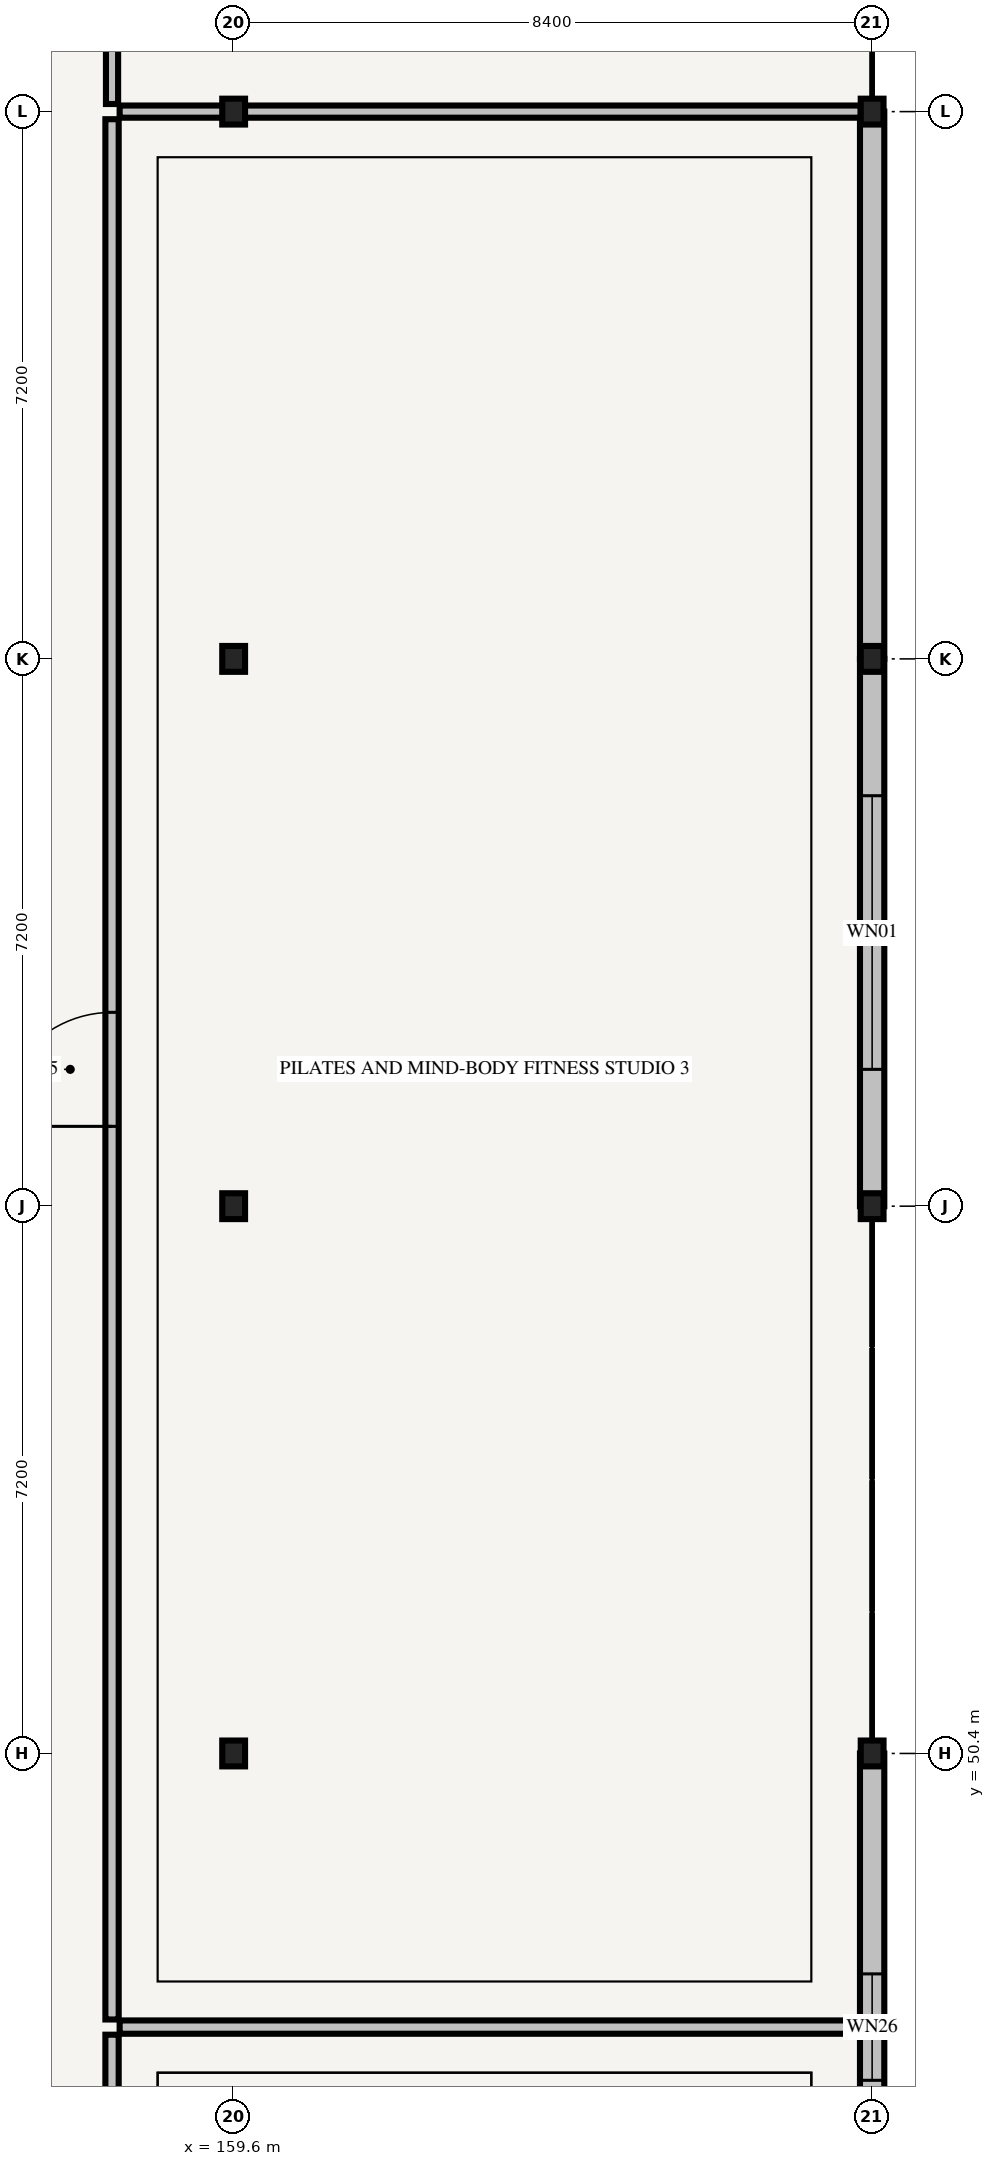
"""IFC4 building model, lengths in metres.
Left out: names, types, materials, properties, quantities, classifications, styles, units other than length and angle.
Written with IfcOpenShell. Run it as: python <this file> out.ifc"""

import sys

from ifc_helpers import new_model, si_unit, direction, frame, frame_2d, origin, origin_2d, place, context, subcontext, project, spatial, rectangle, i_section, extrude, element, fill, save


model = new_model("IFC4")
c1 = context("Model", 3, precision=1e-05, world=origin(), true_north=direction((0.0, 1.0)))
c2 = subcontext(c1, "Body", "Model", "MODEL_VIEW")
j1 = project(units=[si_unit("LENGTHUNIT", "METRE"), si_unit("PLANEANGLEUNIT", "RADIAN")], contexts=[c1])
p1 = place(None, origin())
s1 = spatial("IfcSite", under=j1, at=p1, CompositionType="ELEMENT")
p2 = place(p1, origin())
s2 = spatial("IfcBuilding", under=s1, at=p2, CompositionType="ELEMENT")
p3 = place(p2, frame((0.0, 0.0, 8.7)))
s3 = spatial("IfcBuildingStorey", under=s2, at=p3, CompositionType="ELEMENT", Elevation=8.7)
for number, where, z_axis, x_axis in (
    (1, (159.6, 50.4, 0.0), (0.0, 0.0, 1.0), (1.0, 0.0, 0.0)),
    (2, (159.6, 57.6, 0.0), (0.0, 0.0, 1.0), (1.0, 0.0, 0.0)),
    (3, (159.6, 64.8, 0.0), (0.0, 0.0, 1.0), (1.0, 0.0, 0.0)),
    (4, (159.6, 72.0, 0.0), (0.0, 0.0, 1.0), (1.0, 0.0, 0.0)),
    (5, (168.0, 50.4, 0.0), (0.0, 0.0, 1.0), (1.0, 0.0, 0.0)),
    (6, (168.0, 57.6, 0.0), (0.0, 0.0, 1.0), (1.0, 0.0, 0.0)),
    (7, (168.0, 64.8, 0.0), (0.0, 0.0, 1.0), (1.0, 0.0, 0.0)),
    (8, (168.0, 72.0, 0.0), (0.0, 0.0, 1.0), (1.0, 0.0, 0.0)),
):
    element("IfcColumn", number, at=place(p3, frame(where, z_axis=z_axis, x_axis=x_axis)), inside=s3, PredefinedType="COLUMN", context=c2, shape_type="SweptSolid", body=[
        extrude(i_section(OverallWidth=0.3, OverallDepth=0.34, WebThickness=0.012, FlangeThickness=0.021, FilletRadius=0.027, at=origin_2d()), origin(), (0.0, 0.0, 1.0), 4.2),
    ])
p4 = place(p3, frame((168.0, 43.2, 0.0), z_axis=(0.0, 0.0, 1.0), x_axis=(0.0, 1.0, 0.0)))
e9 = element("IfcWall", 9, at=p4, inside=s3, PredefinedType="STANDARD", context=c2, shape_type="SweptSolid", body=[
    extrude(rectangle(XDim=7.2, YDim=0.32, at=frame_2d((3.6, 0.0))), origin(), (0.0, 0.0, 1.0), 3.485),
])
p5 = place(p4, frame((2.9, 0.0, 0.85)))
e10 = element("IfcOpeningElement", 10, at=p5, cuts=e9, PredefinedType="OPENING", context=c2, shape_type="SweptSolid", body=[
    extrude(rectangle(XDim=1.4, YDim=1.2, at=frame_2d((0.7, 0.6))), frame((0.0, 0.185, 0.0), z_axis=(0.0, -1.0, 0.0), x_axis=(1.0, 0.0, 0.0)), (0.0, 0.0, 1.0), 0.37),
])
p6 = place(p3, frame((168.0, 57.6, 0.0), z_axis=(0.0, 0.0, 1.0), x_axis=(0.0, 1.0, 0.0)))
e11 = element("IfcWall", 11, at=p6, inside=s3, PredefinedType="STANDARD", context=c2, shape_type="SweptSolid", body=[
    extrude(rectangle(XDim=7.2, YDim=0.32, at=frame_2d((3.6, 0.0))), origin(), (0.0, 0.0, 1.0), 3.385),
])
p7 = place(p6, frame((1.8, 0.0, 0.805)))
e12 = element("IfcOpeningElement", 12, at=p7, cuts=e11, PredefinedType="OPENING", context=c2, shape_type="SweptSolid", body=[
    extrude(rectangle(XDim=3.6, YDim=2.4, at=frame_2d((1.8, 1.2))), frame((0.0, 0.185, 0.0), z_axis=(0.0, -1.0, 0.0), x_axis=(1.0, 0.0, 0.0)), (0.0, 0.0, 1.0), 0.37),
])
p8 = place(p3, frame((168.0, 64.8, 0.0), z_axis=(0.0, 0.0, 1.0), x_axis=(0.0, 1.0, 0.0)))
e13 = element("IfcWall", 13, at=p8, inside=s3, PredefinedType="STANDARD", context=c2, shape_type="SweptSolid", body=[
    extrude(rectangle(XDim=7.2, YDim=0.32, at=frame_2d((3.6, 0.0))), origin(), (0.0, 0.0, 1.0), 3.435),
])
p9 = place(p3, frame((158.0, 21.6, 0.0), z_axis=(0.0, 0.0, 1.0), x_axis=(0.0, 1.0, 0.0)))
e14 = element("IfcWall", 14, at=p9, inside=s3, PredefinedType="PARTITIONING", context=c2, shape_type="SweptSolid", body=[
    extrude(rectangle(XDim=25.1, YDim=0.175, at=frame_2d((12.55, 0.0))), origin(), (0.0, 0.0, 1.0), 3.32),
])
p10 = place(p9, frame((11.8, 0.0, 0.0)))
e15 = element("IfcOpeningElement", 15, at=p10, cuts=e14, PredefinedType="OPENING", context=c2, shape_type="SweptSolid", body=[
    extrude(rectangle(XDim=1.5, YDim=2.2, at=frame_2d((0.75, 1.1))), frame((0.0, 0.112, 0.0), z_axis=(0.0, -1.0, 0.0), x_axis=(1.0, 0.0, 0.0)), (0.0, 0.0, 1.0), 0.225),
])
p11 = place(p3, frame((158.0, 46.9, 0.0), z_axis=(0.0, 0.0, 1.0), x_axis=(0.0, 1.0, 0.0)))
e16 = element("IfcWall", 16, at=p11, inside=s3, PredefinedType="PARTITIONING", context=c2, shape_type="SweptSolid", body=[
    extrude(rectangle(XDim=25.0, YDim=0.175, at=frame_2d((12.5, 0.0))), origin(), (0.0, 0.0, 1.0), 3.32),
])
p12 = place(p11, frame((11.75, 0.0, 0.0)))
e17 = element("IfcOpeningElement", 17, at=p12, cuts=e16, PredefinedType="OPENING", context=c2, shape_type="SweptSolid", body=[
    extrude(rectangle(XDim=1.5, YDim=2.2, at=frame_2d((0.75, 1.1))), frame((0.0, 0.112, 0.0), z_axis=(0.0, -1.0, 0.0), x_axis=(1.0, 0.0, 0.0)), (0.0, 0.0, 1.0), 0.225),
])
p13 = place(p3, frame((158.1, 46.8, 0.0), z_axis=(0.0, 0.0, 1.0), x_axis=(1.0, 0.0, 0.0)))
e18 = element("IfcWall", 18, at=p13, inside=s3, PredefinedType="PARTITIONING", context=c2, shape_type="SweptSolid", body=[
    extrude(rectangle(XDim=9.75, YDim=0.175, at=frame_2d((4.875, 0.0))), origin(), (0.0, 0.0, 1.0), 3.32),
])
p14 = place(p3, frame((158.0, 72.1, 0.0), z_axis=(0.0, 0.0, 1.0), x_axis=(0.0, 1.0, 0.0)))
e19 = element("IfcWall", 19, at=p14, inside=s3, PredefinedType="PARTITIONING", context=c2, shape_type="SweptSolid", body=[
    extrude(rectangle(XDim=14.2, YDim=0.16, at=frame_2d((7.1, 0.0))), origin(), (0.0, 0.0, 1.0), 3.32),
])
p15 = place(p14, frame((5.125, 0.0, 0.0)))
e20 = element("IfcOpeningElement", 20, at=p15, cuts=e19, PredefinedType="OPENING", context=c2, shape_type="SweptSolid", body=[
    extrude(rectangle(XDim=1.15, YDim=2.15, at=frame_2d((0.575, 1.075))), frame((0.0, 0.105, 0.0), z_axis=(0.0, -1.0, 0.0), x_axis=(1.0, 0.0, 0.0)), (0.0, 0.0, 1.0), 0.21),
])
p16 = place(p3, frame((158.1, 72.0, 0.0), z_axis=(0.0, 0.0, 1.0), x_axis=(1.0, 0.0, 0.0)))
e21 = element("IfcWall", 21, at=p16, inside=s3, PredefinedType="PARTITIONING", context=c2, shape_type="SweptSolid", body=[
    extrude(rectangle(XDim=9.75, YDim=0.16, at=frame_2d((4.875, 0.0))), origin(), (0.0, 0.0, 1.0), 3.32),
])
p17 = place(p5, origin())
e22 = element("IfcWindow", 22, at=p17, inside=s3, PartitioningType="SINGLE_PANEL", PredefinedType="WINDOW", context=c2, shape_type="SweptSolid", body=[
    extrude(rectangle(XDim=1.4, YDim=1.2, at=frame_2d((0.7, 0.6))), frame((0.0, 0.03, 0.0), z_axis=(0.0, -1.0, 0.0), x_axis=(1.0, 0.0, 0.0)), (0.0, 0.0, 1.0), 0.06),
])
fill(e10, e22)
p18 = place(p7, origin())
e23 = element("IfcWindow", 23, at=p18, inside=s3, PartitioningType="SINGLE_PANEL", PredefinedType="WINDOW", context=c2, shape_type="SweptSolid", body=[
    extrude(rectangle(XDim=3.6, YDim=2.4, at=frame_2d((1.8, 1.2))), frame((0.0, 0.03, 0.0), z_axis=(0.0, -1.0, 0.0), x_axis=(1.0, 0.0, 0.0)), (0.0, 0.0, 1.0), 0.06),
])
fill(e12, e23)
p19 = place(p12, frame((1.5, 0.0, 0.0), z_axis=(0.0, 0.0, 1.0), x_axis=(-1.0, 0.0, 0.0)))
e24 = element("IfcDoor", 24, at=p19, inside=s3, OperationType="DOUBLE_DOOR_SINGLE_SWING", PredefinedType="DOOR", context=c2, shape_type="SweptSolid", body=[
    extrude(rectangle(XDim=1.5, YDim=2.2, at=frame_2d((0.75, 1.1))), frame((0.0, 0.025, 0.0), z_axis=(0.0, -1.0, 0.0), x_axis=(1.0, 0.0, 0.0)), (0.0, 0.0, 1.0), 0.05),
])
fill(e17, e24)
save(model, sys.argv[1])
